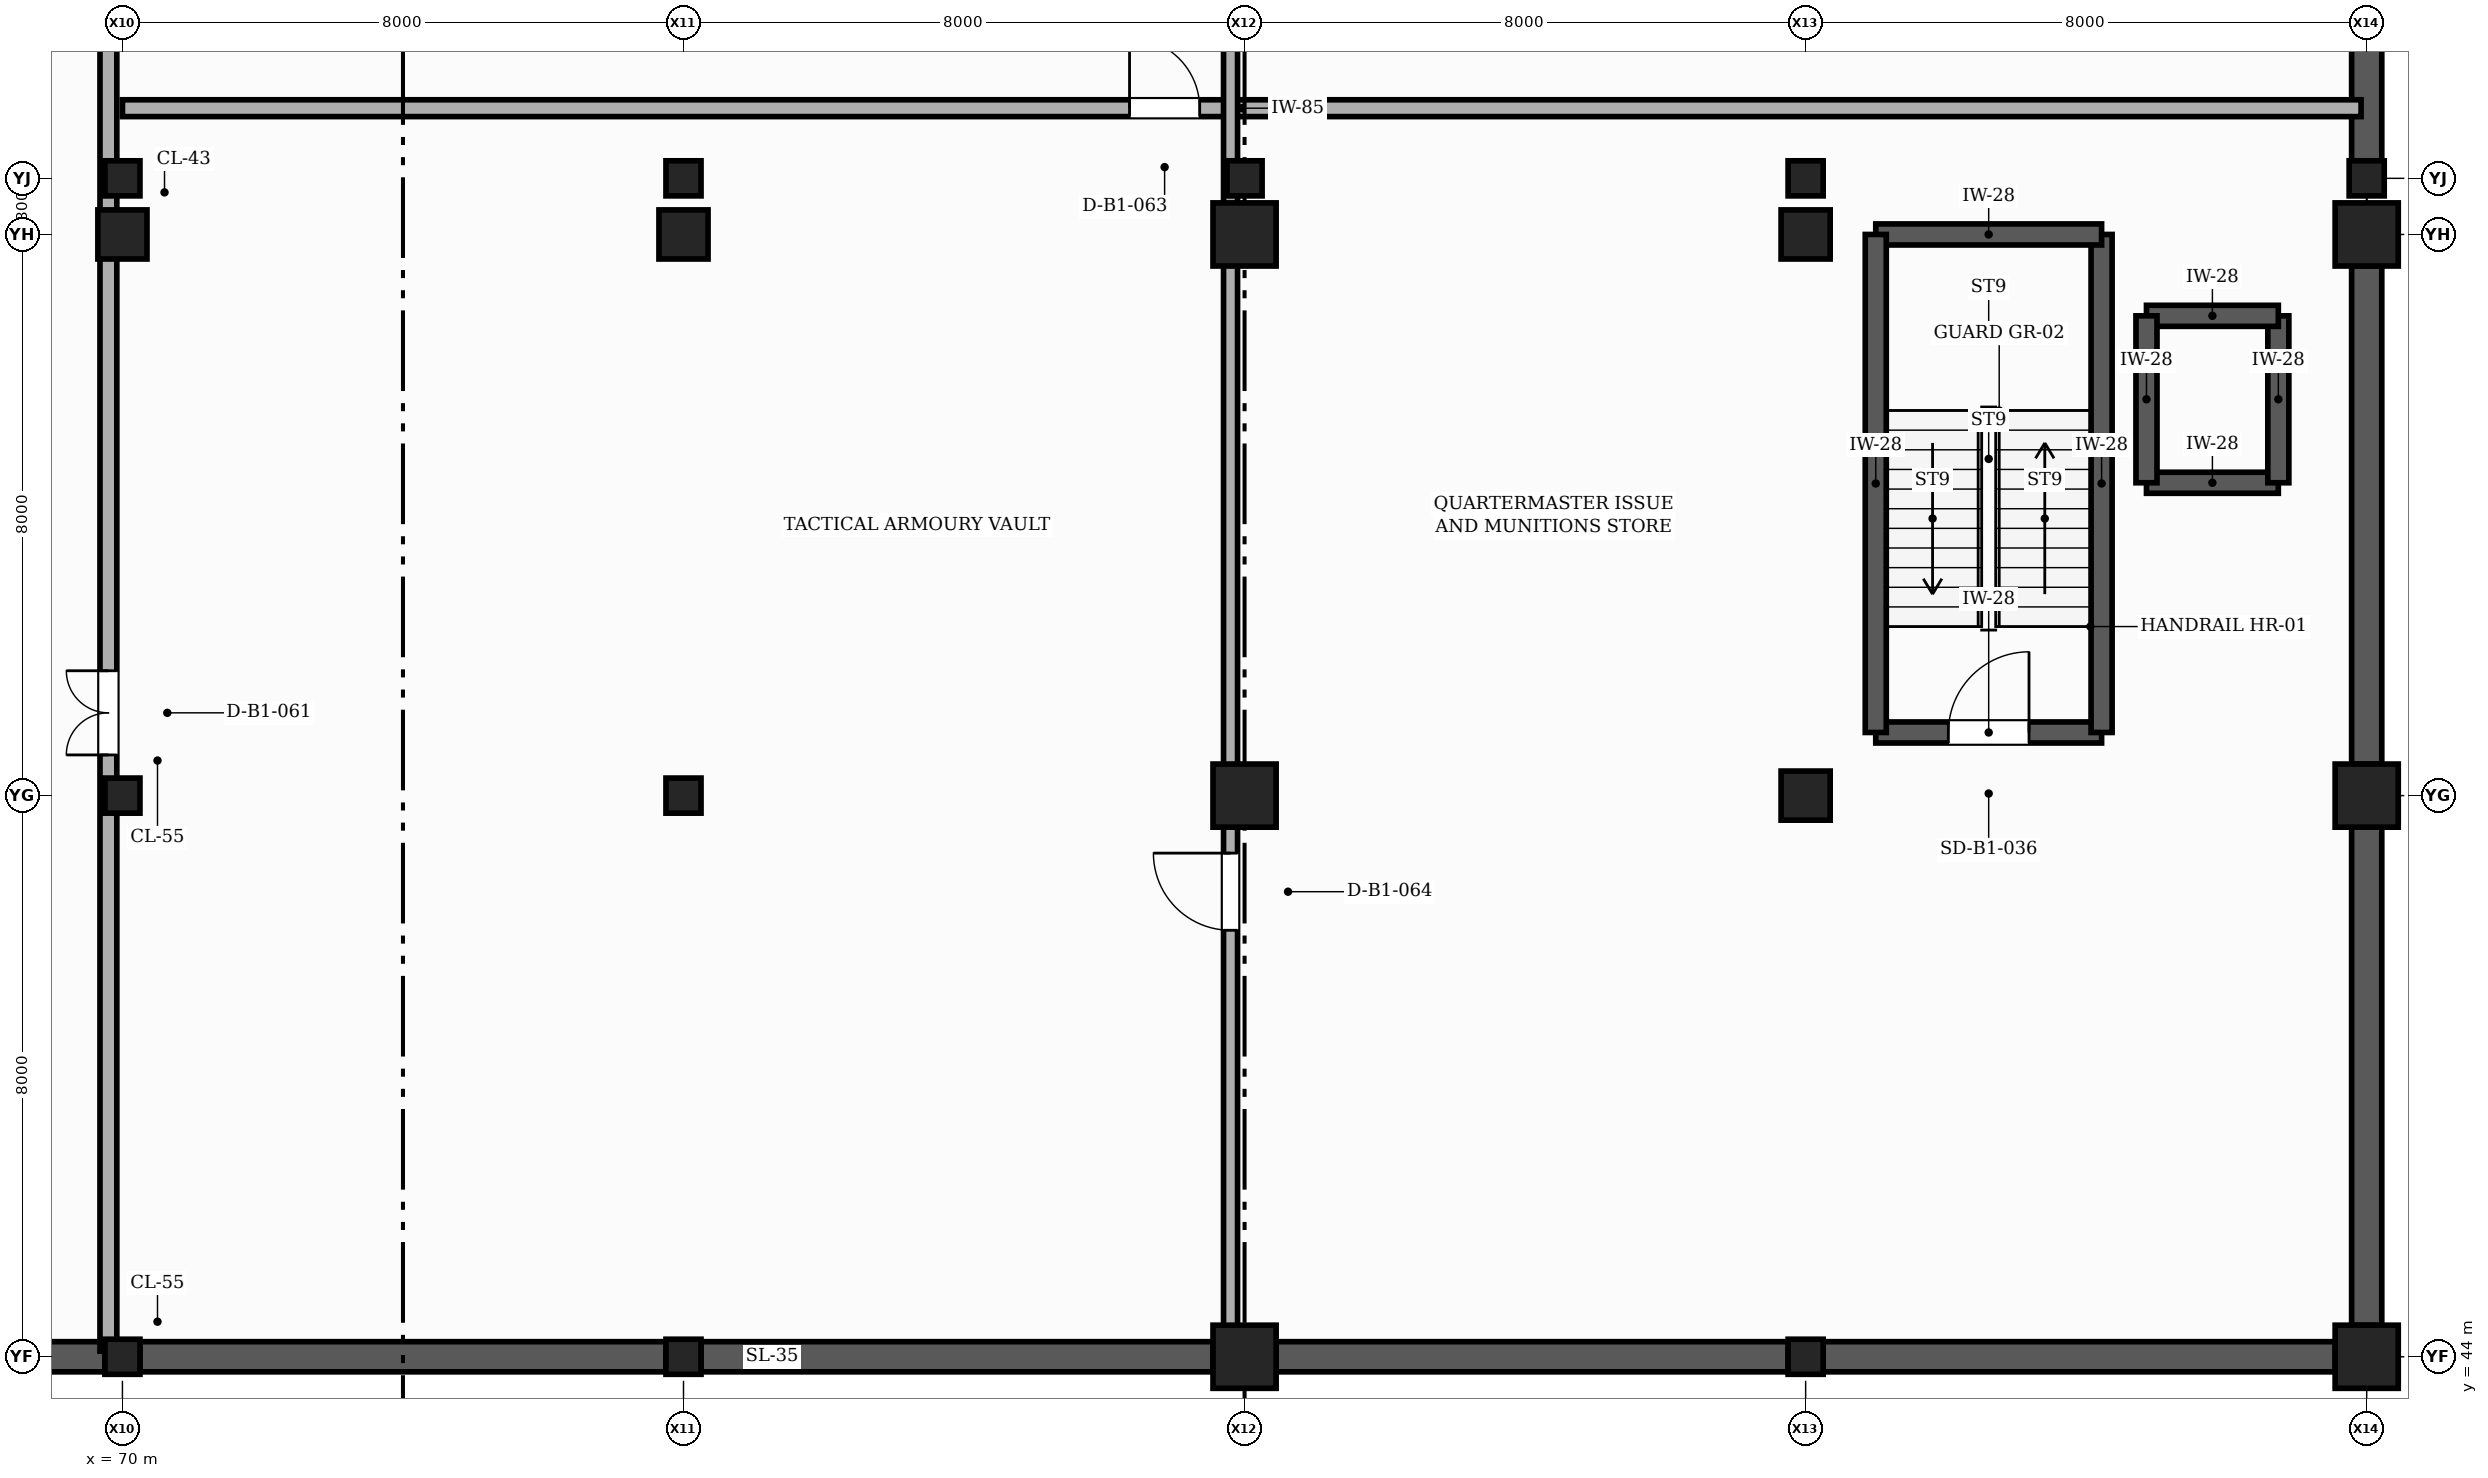
"""IFC4 building model, lengths in metres.
Left out: names, types, materials, properties, quantities, classifications, styles, units other than length and angle.
Written with IfcOpenShell. Run it as: python <this file> out.ifc"""

import sys

from ifc_helpers import new_model, si_unit, direction, frame, frame_2d, origin, origin_2d, place, context, subcontext, project, spatial, rectangle, extrude, element, fill, save


model = new_model("IFC4")
c1 = context("Model", 3, precision=1e-05, world=origin(), true_north=direction((0.0, 1.0)))
c2 = subcontext(c1, "Body", "Model", "MODEL_VIEW")
j1 = project(units=[si_unit("LENGTHUNIT", "METRE"), si_unit("PLANEANGLEUNIT", "RADIAN")], contexts=[c1])
p1 = place(None, origin())
s1 = spatial("IfcSite", under=j1, at=p1, CompositionType="ELEMENT")
p2 = place(p1, origin())
s2 = spatial("IfcBuilding", under=s1, at=p2, CompositionType="ELEMENT")
p3 = place(p2, frame((0.0, 0.0, -4.2)))
s3 = spatial("IfcBuildingStorey", under=s2, at=p3, CompositionType="ELEMENT", Elevation=-4.2)
for number, where, z_axis, x_axis in (
    (1, (70.0, 44.0, -0.52), (0.0, 0.0, 1.0), (1.0, 0.0, 0.0)),
    (2, (70.0, 52.0, -0.52), (0.0, 0.0, 1.0), (1.0, 0.0, 0.0)),
):
    element("IfcColumn", number, at=place(p3, frame(where, z_axis=z_axis, x_axis=x_axis)), inside=s3, PredefinedType="COLUMN", context=c2, shape_type="SweptSolid", body=[
        extrude(rectangle(XDim=0.5, YDim=0.5, at=origin_2d()), origin(), (0.0, 0.0, 1.0), 4.72),
    ])
p4 = place(p3, frame((70.0, 60.0, -0.52), z_axis=(0.0, 0.0, 1.0), x_axis=(1.0, 0.0, 0.0)))
e3 = element("IfcColumn", 3, at=p4, inside=s3, PredefinedType="COLUMN", context=c2, shape_type="SweptSolid", body=[
    extrude(rectangle(XDim=0.7, YDim=0.7, at=origin_2d()), origin(), (0.0, 0.0, 1.0), 4.72),
])
for number, where, z_axis, x_axis in (
    (4, (70.0, 60.8, -0.52), (0.0, 0.0, 1.0), (1.0, 0.0, 0.0)),
    (5, (78.0, 44.0, -0.52), (0.0, 0.0, 1.0), (1.0, 0.0, 0.0)),
    (6, (78.0, 52.0, -0.52), (0.0, 0.0, 1.0), (1.0, 0.0, 0.0)),
):
    element("IfcColumn", number, at=place(p3, frame(where, z_axis=z_axis, x_axis=x_axis)), inside=s3, PredefinedType="COLUMN", context=c2, shape_type="SweptSolid", body=[
        extrude(rectangle(XDim=0.5, YDim=0.5, at=origin_2d()), origin(), (0.0, 0.0, 1.0), 4.72),
    ])
p5 = place(p3, frame((78.0, 60.0, -0.52), z_axis=(0.0, 0.0, 1.0), x_axis=(1.0, 0.0, 0.0)))
e7 = element("IfcColumn", 7, at=p5, inside=s3, PredefinedType="COLUMN", context=c2, shape_type="SweptSolid", body=[
    extrude(rectangle(XDim=0.7, YDim=0.7, at=origin_2d()), origin(), (0.0, 0.0, 1.0), 4.72),
])
p6 = place(p3, frame((78.0, 60.8, -0.52), z_axis=(0.0, 0.0, 1.0), x_axis=(1.0, 0.0, 0.0)))
e8 = element("IfcColumn", 8, at=p6, inside=s3, PredefinedType="COLUMN", context=c2, shape_type="SweptSolid", body=[
    extrude(rectangle(XDim=0.5, YDim=0.5, at=origin_2d()), origin(), (0.0, 0.0, 1.0), 4.72),
])
for number, where, z_axis, x_axis in (
    (9, (86.0, 44.0, -0.52), (0.0, 0.0, 1.0), (1.0, 0.0, 0.0)),
    (10, (86.0, 52.0, -0.52), (0.0, 0.0, 1.0), (1.0, 0.0, 0.0)),
    (11, (86.0, 60.0, -0.52), (0.0, 0.0, 1.0), (1.0, 0.0, 0.0)),
):
    element("IfcColumn", number, at=place(p3, frame(where, z_axis=z_axis, x_axis=x_axis)), inside=s3, PredefinedType="COLUMN", context=c2, shape_type="SweptSolid", body=[
        extrude(rectangle(XDim=0.9, YDim=0.9, at=origin_2d()), origin(), (0.0, 0.0, 1.0), 4.72),
    ])
for number, where, z_axis, x_axis in (
    (12, (86.0, 60.8, -0.52), (0.0, 0.0, 1.0), (1.0, 0.0, 0.0)),
    (13, (94.0, 44.0, -0.52), (0.0, 0.0, 1.0), (1.0, 0.0, 0.0)),
):
    element("IfcColumn", number, at=place(p3, frame(where, z_axis=z_axis, x_axis=x_axis)), inside=s3, PredefinedType="COLUMN", context=c2, shape_type="SweptSolid", body=[
        extrude(rectangle(XDim=0.5, YDim=0.5, at=origin_2d()), origin(), (0.0, 0.0, 1.0), 4.72),
    ])
for number, where, z_axis, x_axis in (
    (14, (94.0, 52.0, -0.52), (0.0, 0.0, 1.0), (1.0, 0.0, 0.0)),
    (15, (94.0, 60.0, -0.52), (0.0, 0.0, 1.0), (1.0, 0.0, 0.0)),
):
    element("IfcColumn", number, at=place(p3, frame(where, z_axis=z_axis, x_axis=x_axis)), inside=s3, PredefinedType="COLUMN", context=c2, shape_type="SweptSolid", body=[
        extrude(rectangle(XDim=0.7, YDim=0.7, at=origin_2d()), origin(), (0.0, 0.0, 1.0), 4.72),
    ])
p7 = place(p3, frame((94.0, 60.8, -0.52), z_axis=(0.0, 0.0, 1.0), x_axis=(1.0, 0.0, 0.0)))
e16 = element("IfcColumn", 16, at=p7, inside=s3, PredefinedType="COLUMN", context=c2, shape_type="SweptSolid", body=[
    extrude(rectangle(XDim=0.5, YDim=0.5, at=origin_2d()), origin(), (0.0, 0.0, 1.0), 4.72),
])
for number, where, z_axis, x_axis in (
    (17, (102.0, 44.0, -0.52), (0.0, 0.0, 1.0), (1.0, 0.0, 0.0)),
    (18, (102.0, 52.0, -0.52), (0.0, 0.0, 1.0), (1.0, 0.0, 0.0)),
    (19, (102.0, 60.0, -0.52), (0.0, 0.0, 1.0), (1.0, 0.0, 0.0)),
):
    element("IfcColumn", number, at=place(p3, frame(where, z_axis=z_axis, x_axis=x_axis)), inside=s3, PredefinedType="COLUMN", context=c2, shape_type="SweptSolid", body=[
        extrude(rectangle(XDim=0.9, YDim=0.9, at=origin_2d()), origin(), (0.0, 0.0, 1.0), 4.72),
    ])
p8 = place(p3, frame((102.0, 60.8, -0.52), z_axis=(0.0, 0.0, 1.0), x_axis=(1.0, 0.0, 0.0)))
e20 = element("IfcColumn", 20, at=p8, inside=s3, PredefinedType="COLUMN", context=c2, shape_type="SweptSolid", body=[
    extrude(rectangle(XDim=0.5, YDim=0.5, at=origin_2d()), origin(), (0.0, 0.0, 1.0), 4.72),
])
p9 = place(p3, frame((62.45, 44.0, -0.44), z_axis=(0.0, 0.0, 1.0), x_axis=(1.0, 0.0, 0.0)))
e21 = element("IfcWall", 21, at=p9, inside=s3, PredefinedType="SOLIDWALL", context=c2, shape_type="SweptSolid", body=[
    extrude(rectangle(XDim=7.3, YDim=0.43, at=frame_2d((3.65, 0.0))), origin(), (0.0, 0.0, 1.0), 3.47),
])
p10 = place(p3, frame((70.25, 44.0, -0.44), z_axis=(0.0, 0.0, 1.0), x_axis=(1.0, 0.0, 0.0)))
e22 = element("IfcWall", 22, at=p10, inside=s3, PredefinedType="SOLIDWALL", context=c2, shape_type="SweptSolid", body=[
    extrude(rectangle(XDim=7.5, YDim=0.43, at=frame_2d((3.75, 0.0))), origin(), (0.0, 0.0, 1.0), 3.47),
])
for number, where, z_axis, x_axis in (
    (23, (78.25, 44.0, -0.44), (0.0, 0.0, 1.0), (1.0, 0.0, 0.0)),
    (24, (86.45, 44.0, -0.44), (0.0, 0.0, 1.0), (1.0, 0.0, 0.0)),
    (25, (94.25, 44.0, -0.44), (0.0, 0.0, 1.0), (1.0, 0.0, 0.0)),
):
    element("IfcWall", number, at=place(p3, frame(where, z_axis=z_axis, x_axis=x_axis)), inside=s3, PredefinedType="SOLIDWALL", context=c2, shape_type="SweptSolid", body=[
        extrude(rectangle(XDim=7.3, YDim=0.43, at=frame_2d((3.65, 0.0))), origin(), (0.0, 0.0, 1.0), 3.47),
    ])
for number, where, z_axis, x_axis in (
    (26, (102.0, 44.45, -0.44), (0.0, 0.0, 1.0), (0.0, 1.0, 0.0)),
    (27, (102.0, 52.45, -0.44), (0.0, 0.0, 1.0), (0.0, 1.0, 0.0)),
):
    element("IfcWall", number, at=place(p3, frame(where, z_axis=z_axis, x_axis=x_axis)), inside=s3, PredefinedType="SOLIDWALL", context=c2, shape_type="SweptSolid", body=[
        extrude(rectangle(XDim=7.1, YDim=0.43, at=frame_2d((3.55, 0.0))), origin(), (0.0, 0.0, 1.0), 3.57),
    ])
p11 = place(p3, frame((102.0, 61.05, -0.44), z_axis=(0.0, 0.0, 1.0), x_axis=(0.0, 1.0, 0.0)))
e28 = element("IfcWall", 28, at=p11, inside=s3, PredefinedType="SOLIDWALL", context=c2, shape_type="SweptSolid", body=[
    extrude(rectangle(XDim=7.5, YDim=0.43, at=frame_2d((3.75, 0.0))), origin(), (0.0, 0.0, 1.0), 3.57),
])
p12 = place(p3, frame((95.0, 52.9, -0.52), z_axis=(0.0, 0.0, 1.0), x_axis=(1.0, 0.0, 0.0)))
e29 = element("IfcWall", 29, at=p12, inside=s3, PredefinedType="SHEAR", context=c2, shape_type="SweptSolid", body=[
    extrude(rectangle(XDim=3.22, YDim=0.3, at=frame_2d((1.61, 0.0))), origin(), (0.0, 0.0, 1.0), 4.72),
])
p13 = place(p12, frame((1.035, 0.0, 0.52)))
e30 = element("IfcOpeningElement", 30, at=p13, cuts=e29, PredefinedType="OPENING", context=c2, shape_type="SweptSolid", body=[
    extrude(rectangle(XDim=1.15, YDim=2.15, at=frame_2d((0.575, 1.075))), frame((0.0, 0.16, 0.0), z_axis=(0.0, -1.0, 0.0), x_axis=(1.0, 0.0, 0.0)), (0.0, 0.0, 1.0), 0.32),
])
p14 = place(p3, frame((98.22, 52.9, -0.52), z_axis=(0.0, 0.0, 1.0), x_axis=(0.0, 1.0, 0.0)))
e31 = element("IfcWall", 31, at=p14, inside=s3, PredefinedType="SHEAR", context=c2, shape_type="SweptSolid", body=[
    extrude(rectangle(XDim=7.1, YDim=0.3, at=frame_2d((3.55, 0.0))), origin(), (0.0, 0.0, 1.0), 4.72),
])
p15 = place(p3, frame((98.22, 60.0, -0.52), z_axis=(0.0, 0.0, 1.0), x_axis=(-1.0, 0.0, 0.0)))
e32 = element("IfcWall", 32, at=p15, inside=s3, PredefinedType="SHEAR", context=c2, shape_type="SweptSolid", body=[
    extrude(rectangle(XDim=3.22, YDim=0.3, at=frame_2d((1.61, 0.0))), origin(), (0.0, 0.0, 1.0), 4.72),
])
p16 = place(p3, frame((95.0, 60.0, -0.52), z_axis=(0.0, 0.0, 1.0), x_axis=(0.0, -1.0, 0.0)))
e33 = element("IfcWall", 33, at=p16, inside=s3, PredefinedType="SHEAR", context=c2, shape_type="SweptSolid", body=[
    extrude(rectangle(XDim=7.1, YDim=0.3, at=frame_2d((3.55, 0.0))), origin(), (0.0, 0.0, 1.0), 4.72),
])
p17 = place(p3, frame((98.86, 56.46, -0.52), z_axis=(0.0, 0.0, 1.0), x_axis=(1.0, 0.0, 0.0)))
e34 = element("IfcWall", 34, at=p17, inside=s3, PredefinedType="SHEAR", context=c2, shape_type="SweptSolid", body=[
    extrude(rectangle(XDim=1.88, YDim=0.3, at=frame_2d((0.94, 0.0))), origin(), (0.0, 0.0, 1.0), 4.22),
])
p18 = place(p3, frame((100.74, 56.46, -0.52), z_axis=(0.0, 0.0, 1.0), x_axis=(0.0, 1.0, 0.0)))
e35 = element("IfcWall", 35, at=p18, inside=s3, PredefinedType="SHEAR", context=c2, shape_type="SweptSolid", body=[
    extrude(rectangle(XDim=2.38, YDim=0.3, at=frame_2d((1.19, 0.0))), origin(), (0.0, 0.0, 1.0), 4.22),
])
p19 = place(p3, frame((100.74, 58.84, -0.52), z_axis=(0.0, 0.0, 1.0), x_axis=(-1.0, 0.0, 0.0)))
e36 = element("IfcWall", 36, at=p19, inside=s3, PredefinedType="SHEAR", context=c2, shape_type="SweptSolid", body=[
    extrude(rectangle(XDim=1.88, YDim=0.3, at=frame_2d((0.94, 0.0))), origin(), (0.0, 0.0, 1.0), 4.22),
])
p20 = place(p3, frame((98.86, 58.84, -0.52), z_axis=(0.0, 0.0, 1.0), x_axis=(0.0, -1.0, 0.0)))
e37 = element("IfcWall", 37, at=p20, inside=s3, PredefinedType="SHEAR", context=c2, shape_type="SweptSolid", body=[
    extrude(rectangle(XDim=2.38, YDim=0.3, at=frame_2d((1.19, 0.0))), origin(), (0.0, 0.0, 1.0), 4.22),
])
p21 = place(p3, frame((69.8, 44.08, 0.0), z_axis=(0.0, 0.0, 1.0), x_axis=(0.0, 1.0, 0.0)))
e38 = element("IfcWall", 38, at=p21, inside=s3, PredefinedType="PARTITIONING", context=c2, shape_type="SweptSolid", body=[
    extrude(rectangle(XDim=37.72, YDim=0.24, at=frame_2d((18.86, 0.0))), origin(), (0.0, 0.0, 1.0), 2.915),
])
p22 = place(p21, frame((8.5, 0.0, 0.0)))
e39 = element("IfcOpeningElement", 39, at=p22, cuts=e38, PredefinedType="OPENING", context=c2, shape_type="SweptSolid", body=[
    extrude(rectangle(XDim=1.2, YDim=2.15, at=frame_2d((0.6, 1.075))), frame((0.0, 0.13, 0.0), z_axis=(0.0, -1.0, 0.0), x_axis=(1.0, 0.0, 0.0)), (0.0, 0.0, 1.0), 0.26),
])
p23 = place(p21, frame((23.0, 0.0, 0.0)))
e40 = element("IfcOpeningElement", 40, at=p23, cuts=e38, PredefinedType="OPENING", context=c2, shape_type="SweptSolid", body=[
    extrude(rectangle(XDim=1.2, YDim=2.15, at=frame_2d((0.6, 1.075))), frame((0.0, 0.13, 0.0), z_axis=(0.0, -1.0, 0.0), x_axis=(1.0, 0.0, 0.0)), (0.0, 0.0, 1.0), 0.26),
])
p24 = place(p3, frame((70.0, 61.8, 0.0), z_axis=(0.0, 0.0, 1.0), x_axis=(1.0, 0.0, 0.0)))
e41 = element("IfcWall", 41, at=p24, inside=s3, PredefinedType="PARTITIONING", context=c2, shape_type="SweptSolid", body=[
    extrude(rectangle(XDim=31.92, YDim=0.24, at=frame_2d((15.96, 0.0))), origin(), (0.0, 0.0, 1.0), 3.115),
])
p25 = place(p24, frame((14.36, 0.0, 0.0)))
e42 = element("IfcOpeningElement", 42, at=p25, cuts=e41, PredefinedType="OPENING", context=c2, shape_type="SweptSolid", body=[
    extrude(rectangle(XDim=1.0, YDim=2.15, at=frame_2d((0.5, 1.075))), frame((0.0, 0.13, 0.0), z_axis=(0.0, -1.0, 0.0), x_axis=(1.0, 0.0, 0.0)), (0.0, 0.0, 1.0), 0.26),
])
p26 = place(p3, frame((85.8, 44.08, 0.0), z_axis=(0.0, 0.0, 1.0), x_axis=(0.0, 1.0, 0.0)))
e43 = element("IfcWall", 43, at=p26, inside=s3, PredefinedType="PARTITIONING", context=c2, shape_type="SweptSolid", body=[
    extrude(rectangle(XDim=37.72, YDim=0.2, at=frame_2d((18.86, 0.0))), origin(), (0.0, 0.0, 1.0), 2.915),
])
p27 = place(p26, frame((6.0, 0.0, 0.0)))
e44 = element("IfcOpeningElement", 44, at=p27, cuts=e43, PredefinedType="OPENING", context=c2, shape_type="SweptSolid", body=[
    extrude(rectangle(XDim=1.1, YDim=2.15, at=frame_2d((0.55, 1.075))), frame((0.0, 0.11, 0.0), z_axis=(0.0, -1.0, 0.0), x_axis=(1.0, 0.0, 0.0)), (0.0, 0.0, 1.0), 0.22),
])
p28 = place(p26, frame((23.0, 0.0, 0.0)))
e45 = element("IfcOpeningElement", 45, at=p28, cuts=e43, PredefinedType="OPENING", context=c2, shape_type="SweptSolid", body=[
    extrude(rectangle(XDim=1.2, YDim=2.15, at=frame_2d((0.6, 1.075))), frame((0.0, 0.11, 0.0), z_axis=(0.0, -1.0, 0.0), x_axis=(1.0, 0.0, 0.0)), (0.0, 0.0, 1.0), 0.22),
])
p29 = place(p13, origin())
e46 = element("IfcDoor", 46, at=p29, inside=s3, OperationType="SINGLE_SWING_RIGHT", PredefinedType="DOOR", context=c2, shape_type="SweptSolid", body=[
    extrude(rectangle(XDim=1.15, YDim=2.15, at=frame_2d((0.575, 1.075))), frame((0.0, 0.025, 0.0), z_axis=(0.0, -1.0, 0.0), x_axis=(1.0, 0.0, 0.0)), (0.0, 0.0, 1.0), 0.05),
])
fill(e30, e46)
p30 = place(p22, origin())
e47 = element("IfcDoor", 47, at=p30, inside=s3, OperationType="DOUBLE_DOOR_SINGLE_SWING", PredefinedType="DOOR", context=c2, shape_type="SweptSolid", body=[
    extrude(rectangle(XDim=1.2, YDim=2.15, at=frame_2d((0.6, 1.075))), frame((0.0, 0.025, 0.0), z_axis=(0.0, -1.0, 0.0), x_axis=(1.0, 0.0, 0.0)), (0.0, 0.0, 1.0), 0.05),
])
fill(e39, e47)
p31 = place(p25, origin())
e48 = element("IfcDoor", 48, at=p31, inside=s3, OperationType="SINGLE_SWING_LEFT", PredefinedType="DOOR", context=c2, shape_type="SweptSolid", body=[
    extrude(rectangle(XDim=1.0, YDim=2.15, at=frame_2d((0.5, 1.075))), frame((0.0, 0.025, 0.0), z_axis=(0.0, -1.0, 0.0), x_axis=(1.0, 0.0, 0.0)), (0.0, 0.0, 1.0), 0.05),
])
fill(e42, e48)
p32 = place(p27, origin())
e49 = element("IfcDoor", 49, at=p32, inside=s3, OperationType="SINGLE_SWING_RIGHT", PredefinedType="DOOR", context=c2, shape_type="SweptSolid", body=[
    extrude(rectangle(XDim=1.1, YDim=2.15, at=frame_2d((0.55, 1.075))), frame((0.0, 0.025, 0.0), z_axis=(0.0, -1.0, 0.0), x_axis=(1.0, 0.0, 0.0)), (0.0, 0.0, 1.0), 0.05),
])
fill(e44, e49)
save(model, sys.argv[1])
